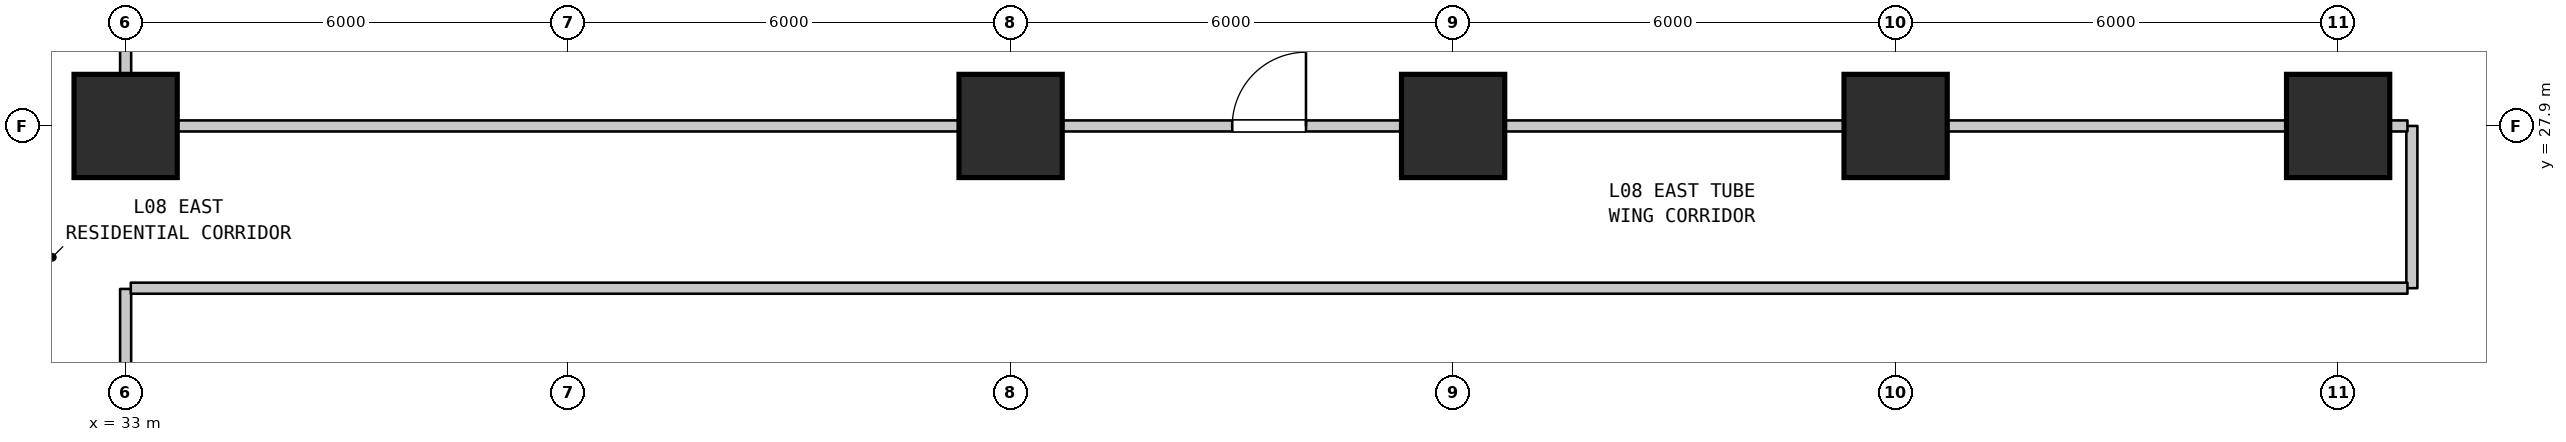
"""IFC4 building model, lengths in metres.
Left out: names, types, materials, properties, quantities, classifications, styles, units other than length and angle.
Written with IfcOpenShell. Run it as: python <this file> out.ifc"""

import sys

from ifc_helpers import new_model, si_unit, direction, frame, frame_2d, origin, origin_2d, place, context, subcontext, project, spatial, rectangle, extrude, element, fill, save


model = new_model("IFC4")
c1 = context("Model", 3, precision=1e-05, world=origin(), true_north=direction((0.0, 1.0)))
c2 = subcontext(c1, "Body", "Model", "MODEL_VIEW")
j1 = project(units=[si_unit("LENGTHUNIT", "METRE"), si_unit("PLANEANGLEUNIT", "RADIAN")], contexts=[c1])
p1 = place(None, origin())
s1 = spatial("IfcSite", under=j1, at=p1, CompositionType="ELEMENT")
p2 = place(p1, origin())
s2 = spatial("IfcBuilding", under=s1, at=p2, CompositionType="ELEMENT")
p3 = place(p2, frame((0.0, 0.0, 38.8)))
s3 = spatial("IfcBuildingStorey", under=s2, at=p3, CompositionType="ELEMENT", Elevation=38.8)
for number, where, z_axis, x_axis in (
    (1, (33.0, 27.9, 0.0), (0.0, 0.0, 1.0), (1.0, 0.0, 0.0)),
    (2, (45.0, 27.9, 0.0), (0.0, 0.0, 1.0), (1.0, 0.0, 0.0)),
    (3, (51.0, 27.9, 0.0), (0.0, 0.0, 1.0), (1.0, 0.0, 0.0)),
    (4, (57.0, 27.9, 0.0), (0.0, 0.0, 1.0), (1.0, 0.0, 0.0)),
    (5, (63.0, 27.9, 0.0), (0.0, 0.0, 1.0), (1.0, 0.0, 0.0)),
):
    element("IfcColumn", number, at=place(p3, frame(where, z_axis=z_axis, x_axis=x_axis)), inside=s3, PredefinedType="COLUMN", context=c2, shape_type="SweptSolid", body=[
        extrude(rectangle(XDim=1.4, YDim=1.4, at=origin_2d()), origin(), (0.0, 0.0, 1.0), 3.7),
    ])
p4 = place(p3, frame((33.0, 19.66, 0.0), z_axis=(0.0, 0.0, 1.0), x_axis=(0.0, 1.0, 0.0)))
e6 = element("IfcWall", 6, at=p4, inside=s3, PredefinedType="STANDARD", context=c2, shape_type="SweptSolid", body=[
    extrude(rectangle(XDim=6.03, YDim=0.15, at=frame_2d((3.015, 0.0))), origin(), (0.0, 0.0, 1.0), 2.885),
])
p5 = place(p3, frame((33.0, 27.91, 0.0), z_axis=(0.0, 0.0, 1.0), x_axis=(0.0, 1.0, 0.0)))
e7 = element("IfcWall", 7, at=p5, inside=s3, PredefinedType="STANDARD", context=c2, shape_type="SweptSolid", body=[
    extrude(rectangle(XDim=9.98, YDim=0.15, at=frame_2d((4.99, 0.0))), origin(), (0.0, 0.0, 1.0), 2.885),
])
p6 = place(p3, frame((64.0, 25.7, 0.0), z_axis=(0.0, 0.0, 1.0), x_axis=(0.0, 1.0, 0.0)))
e8 = element("IfcWall", 8, at=p6, inside=s3, PredefinedType="STANDARD", context=c2, shape_type="SweptSolid", body=[
    extrude(rectangle(XDim=2.2, YDim=0.15, at=frame_2d((1.1, 0.0))), origin(), (0.0, 0.0, 1.0), 3.385),
])
p7 = place(p3, frame((33.07, 25.7, 0.0), z_axis=(0.0, 0.0, 1.0), x_axis=(1.0, 0.0, 0.0)))
e9 = element("IfcWall", 9, at=p7, inside=s3, PredefinedType="STANDARD", context=c2, shape_type="SweptSolid", body=[
    extrude(rectangle(XDim=30.87, YDim=0.15, at=frame_2d((15.435, 0.0))), origin(), (0.0, 0.0, 1.0), 3.385),
])
p8 = place(p3, frame((33.07, 27.9, 0.0), z_axis=(0.0, 0.0, 1.0), x_axis=(1.0, 0.0, 0.0)))
e10 = element("IfcWall", 10, at=p8, inside=s3, PredefinedType="STANDARD", context=c2, shape_type="SweptSolid", body=[
    extrude(rectangle(XDim=30.87, YDim=0.15, at=frame_2d((15.435, 0.0))), origin(), (0.0, 0.0, 1.0), 2.885),
])
p9 = place(p8, frame((14.935, 0.0, 0.0)))
e11 = element("IfcOpeningElement", 11, at=p9, cuts=e10, PredefinedType="OPENING", context=c2, shape_type="SweptSolid", body=[
    extrude(rectangle(XDim=1.0, YDim=2.15, at=frame_2d((0.5, 1.075))), frame((0.0, 0.085, 0.0), z_axis=(0.0, -1.0, 0.0), x_axis=(1.0, 0.0, 0.0)), (0.0, 0.0, 1.0), 0.17),
])
p10 = place(p9, origin())
e12 = element("IfcDoor", 12, at=p10, inside=s3, OperationType="SINGLE_SWING_RIGHT", PredefinedType="DOOR", context=c2, shape_type="SweptSolid", body=[
    extrude(rectangle(XDim=1.0, YDim=2.15, at=frame_2d((0.5, 1.075))), frame((0.0, 0.025, 0.0), z_axis=(0.0, -1.0, 0.0), x_axis=(1.0, 0.0, 0.0)), (0.0, 0.0, 1.0), 0.05),
])
fill(e11, e12)
save(model, sys.argv[1])
